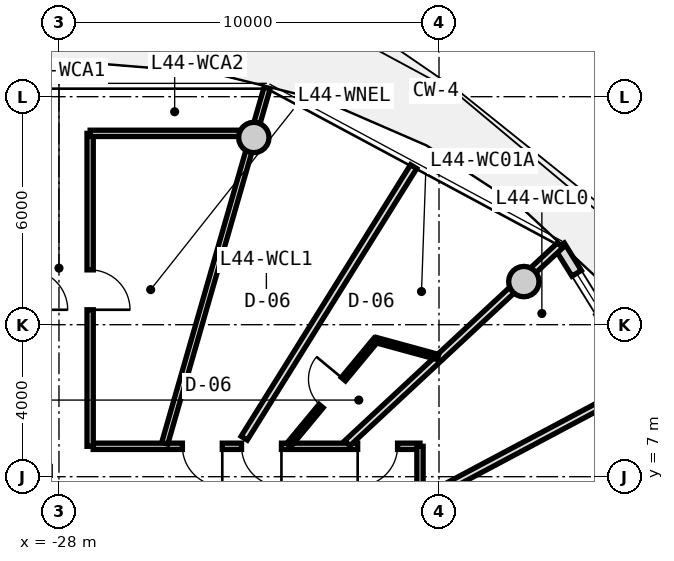
"""IFC4 building model, lengths in metres.
Left out: names, types, materials, properties, quantities, classifications, styles, units other than length and angle.
Written with IfcOpenShell. Run it as: python <this file> out.ifc"""

import sys

from ifc_helpers import new_model, si_unit, direction, frame, frame_2d, origin, origin_2d, place, context, subcontext, project, spatial, rectangle, circle, extrude, source, transform, mapped, element, fill, save


model = new_model("IFC4")
c1 = context("Model", 3, precision=1e-05, world=origin(), true_north=direction((0.0, 1.0)))
c2 = subcontext(c1, "Body", "Model", "MODEL_VIEW")
j1 = project(units=[si_unit("LENGTHUNIT", "METRE"), si_unit("PLANEANGLEUNIT", "RADIAN")], contexts=[c1])
p1 = place(None, origin())
s1 = spatial("IfcSite", under=j1, at=p1, CompositionType="ELEMENT")
p2 = place(p1, origin())
s2 = spatial("IfcBuilding", under=s1, at=p2, CompositionType="ELEMENT")
p3 = place(p2, frame((0.0, 0.0, 143.45)))
s3 = spatial("IfcBuildingStorey", under=s2, at=p3, CompositionType="ELEMENT", Elevation=143.45)
m1 = source(origin(), c2, "Body", "SweptSolid", [
    extrude(circle(Radius=0.4, at=origin_2d()), origin(), (0.0, 0.0, 1.0), 3.05),
])
for number, where, z_axis, x_axis in (
    (1, (-15.767, 12.135, 0.0), (0.0, 0.0, 1.0), (1.0, 0.0, 0.0)),
    (2, (-22.873, 15.926, 0.0), (0.0, 0.0, 1.0), (1.0, 0.0, 0.0)),
):
    element("IfcColumn", number, at=place(p3, frame(where, z_axis=z_axis, x_axis=x_axis)), inside=s3, PredefinedType="COLUMN", context=c2, shape_type="MappedRepresentation", body=[
        mapped(m1, transform((0.0, 0.0, 0.0), x_axis=(1.0, 0.0, 0.0), y_axis=(0.0, 1.0, 0.0), z_axis=(0.0, 0.0, 1.0), scale=1.0)),
    ])
m2 = source(origin(), c2, "Body", "SweptSolid", [
    extrude(rectangle(XDim=8.431, YDim=0.29, at=frame_2d((4.216, 0.0))), origin(), (0.0, 0.0, 1.0), 2.81),
])
p4 = place(p3, frame((-14.827, 13.075, 0.0), z_axis=(0.0, 0.0, 1.0), x_axis=(0.527377998418, -0.849630770855, 0.0)))
e3 = element("IfcWall", 3, at=p4, inside=s3, PredefinedType="SOLIDWALL", context=c2, shape_type="MappedRepresentation", body=[
    mapped(m2, transform((0.0, 0.0, 0.0), x_axis=(1.0, 0.0, 0.0), y_axis=(0.0, 1.0, 0.0), z_axis=(0.0, 0.0, 1.0), scale=1.0)),
])
p5 = place(p4, frame((5.78, 0.0, 0.0)))
e4 = element("IfcOpeningElement", 4, at=p5, cuts=e3, PredefinedType="OPENING", context=c2, shape_type="SweptSolid", body=[
    extrude(rectangle(XDim=1.15, YDim=2.25, at=frame_2d((0.575, 1.125))), frame((0.0, 0.155, 0.0), z_axis=(0.0, -1.0, 0.0), x_axis=(1.0, 0.0, 0.0)), (0.0, 0.0, 1.0), 0.31),
])
p6 = place(p4, frame((0.85, 0.0, 0.85)))
e5 = element("IfcOpeningElement", 5, at=p6, cuts=e3, PredefinedType="OPENING", context=c2, shape_type="SweptSolid", body=[
    extrude(rectangle(XDim=1.2, YDim=1.5, at=frame_2d((0.6, 0.75))), frame((0.0, 0.155, 0.0), z_axis=(0.0, -1.0, 0.0), x_axis=(1.0, 0.0, 0.0)), (0.0, 0.0, 1.0), 0.31),
])
m3 = source(origin(), c2, "Body", "SweptSolid", [
    extrude(rectangle(XDim=8.6, YDim=0.165, at=frame_2d((4.3, 0.0))), origin(), (0.0, 0.0, 1.0), 2.795),
])
p7 = place(p3, frame((-27.1, 7.8, 0.0), z_axis=(0.0, 0.0, 1.0), x_axis=(1.0, 0.0, 0.0)))
e6 = element("IfcWall", 6, at=p7, inside=s3, PredefinedType="PARTITIONING", context=c2, shape_type="MappedRepresentation", body=[
    mapped(m3, transform((0.0, 0.0, 0.0), x_axis=(1.0, 0.0, 0.0), y_axis=(0.0, 1.0, 0.0), z_axis=(0.0, 0.0, 1.0), scale=1.0)),
])
p8 = place(p7, frame((6.96, 0.0, 0.0)))
e7 = element("IfcOpeningElement", 7, at=p8, cuts=e6, PredefinedType="OPENING", context=c2, shape_type="SweptSolid", body=[
    extrude(rectangle(XDim=1.05, YDim=2.15, at=frame_2d((0.525, 1.075))), frame((0.0, 0.093, 0.0), z_axis=(0.0, -1.0, 0.0), x_axis=(1.0, 0.0, 0.0)), (0.0, 0.0, 1.0), 0.185),
])
p9 = place(p7, frame((3.904, 0.0, 0.0)))
e8 = element("IfcOpeningElement", 8, at=p9, cuts=e6, PredefinedType="OPENING", context=c2, shape_type="SweptSolid", body=[
    extrude(rectangle(XDim=1.05, YDim=2.15, at=frame_2d((0.525, 1.075))), frame((0.0, 0.093, 0.0), z_axis=(0.0, -1.0, 0.0), x_axis=(1.0, 0.0, 0.0)), (0.0, 0.0, 1.0), 0.185),
])
p10 = place(p7, frame((2.347, 0.0, 0.0)))
e9 = element("IfcOpeningElement", 9, at=p10, cuts=e6, PredefinedType="OPENING", context=c2, shape_type="SweptSolid", body=[
    extrude(rectangle(XDim=1.05, YDim=2.15, at=frame_2d((0.525, 1.075))), frame((0.0, 0.093, 0.0), z_axis=(0.0, -1.0, 0.0), x_axis=(1.0, 0.0, 0.0)), (0.0, 0.0, 1.0), 0.185),
])
m4 = source(origin(), c2, "Body", "SweptSolid", [
    extrude(rectangle(XDim=15.6, YDim=0.165, at=frame_2d((7.8, 0.0))), origin(), (0.0, 0.0, 1.0), 2.795),
])
p11 = place(p3, frame((-18.5, 7.8, 0.0), z_axis=(0.0, 0.0, 1.0), x_axis=(0.0, -1.0, 0.0)))
e10 = element("IfcWall", 10, at=p11, inside=s3, PredefinedType="PARTITIONING", context=c2, shape_type="MappedRepresentation", body=[
    mapped(m4, transform((0.0, 0.0, 0.0), x_axis=(1.0, 0.0, 0.0), y_axis=(0.0, 1.0, 0.0), z_axis=(0.0, 0.0, 1.0), scale=1.0)),
])
p12 = place(p11, frame((8.314, 0.0, 0.0)))
e11 = element("IfcOpeningElement", 11, at=p12, cuts=e10, PredefinedType="OPENING", context=c2, shape_type="SweptSolid", body=[
    extrude(rectangle(XDim=1.25, YDim=2.2, at=frame_2d((0.625, 1.1))), frame((0.0, 0.093, 0.0), z_axis=(0.0, -1.0, 0.0), x_axis=(1.0, 0.0, 0.0)), (0.0, 0.0, 1.0), 0.185),
])
p13 = place(p11, frame((1.515, 0.0, 0.0)))
e12 = element("IfcOpeningElement", 12, at=p13, cuts=e10, PredefinedType="OPENING", context=c2, shape_type="SweptSolid", body=[
    extrude(rectangle(XDim=1.05, YDim=2.15, at=frame_2d((0.525, 1.075))), frame((0.0, 0.093, 0.0), z_axis=(0.0, -1.0, 0.0), x_axis=(1.0, 0.0, 0.0)), (0.0, 0.0, 1.0), 0.185),
])
m5 = source(origin(), c2, "Body", "SweptSolid", [
    extrude(rectangle(XDim=9.73, YDim=0.165, at=frame_2d((4.865, 0.0))), origin(), (0.0, 0.0, 1.0), 2.435),
])
p14 = place(p3, frame((-25.217, 7.88, 0.0), z_axis=(0.0, 0.0, 1.0), x_axis=(0.27679492614, 0.960929013436, 0.0)))
e13 = element("IfcWall", 13, at=p14, inside=s3, PredefinedType="PARTITIONING", context=c2, shape_type="MappedRepresentation", body=[
    mapped(m5, transform((0.0, 0.0, 0.0), x_axis=(1.0, 0.0, 0.0), y_axis=(0.0, 1.0, 0.0), z_axis=(0.0, 0.0, 1.0), scale=1.0)),
])
m6 = source(origin(), c2, "Body", "SweptSolid", [
    extrude(rectangle(XDim=8.235, YDim=0.165, at=frame_2d((4.118, 0.0))), origin(), (0.0, 0.0, 1.0), 2.795),
])
p15 = place(p3, frame((-27.18, 7.8, 0.0), z_axis=(0.0, 0.0, 1.0), x_axis=(0.0, 1.0, 0.0)))
e14 = element("IfcWall", 14, at=p15, inside=s3, PredefinedType="PARTITIONING", context=c2, shape_type="MappedRepresentation", body=[
    mapped(m6, transform((0.0, 0.0, 0.0), x_axis=(1.0, 0.0, 0.0), y_axis=(0.0, 1.0, 0.0), z_axis=(0.0, 0.0, 1.0), scale=1.0)),
])
p16 = place(p15, frame((3.593, 0.0, 0.0)))
e15 = element("IfcOpeningElement", 15, at=p16, cuts=e14, PredefinedType="OPENING", context=c2, shape_type="SweptSolid", body=[
    extrude(rectangle(XDim=1.05, YDim=2.15, at=frame_2d((0.525, 1.075))), frame((0.0, 0.093, 0.0), z_axis=(0.0, -1.0, 0.0), x_axis=(1.0, 0.0, 0.0)), (0.0, 0.0, 1.0), 0.185),
])
m7 = source(origin(), c2, "Body", "SweptSolid", [
    extrude(rectangle(XDim=4.469, YDim=0.165, at=frame_2d((2.234, 0.0))), origin(), (0.0, 0.0, 1.0), 2.345),
])
p17 = place(p3, frame((-27.18, 16.035, 0.0), z_axis=(0.0, 0.0, 1.0), x_axis=(1.0, 0.0, 0.0)))
e16 = element("IfcWall", 16, at=p17, inside=s3, PredefinedType="PARTITIONING", context=c2, shape_type="MappedRepresentation", body=[
    mapped(m7, transform((0.0, 0.0, 0.0), x_axis=(1.0, 0.0, 0.0), y_axis=(0.0, 1.0, 0.0), z_axis=(0.0, 0.0, 1.0), scale=1.0)),
])
m8 = source(origin(), c2, "Body", "SweptSolid", [
    extrude(rectangle(XDim=7.648, YDim=0.19, at=frame_2d((3.824, 0.0))), origin(), (0.0, 0.0, 1.0), 2.345),
])
p18 = place(p3, frame((-20.413, 7.88, 0.0), z_axis=(0.0, 0.0, 1.0), x_axis=(0.732182665826, 0.681108320213, 0.0)))
e17 = element("IfcWall", 17, at=p18, inside=s3, PredefinedType="PARTITIONING", context=c2, shape_type="MappedRepresentation", body=[
    mapped(m8, transform((0.0, 0.0, 0.0), x_axis=(1.0, 0.0, 0.0), y_axis=(0.0, 1.0, 0.0), z_axis=(0.0, 0.0, 1.0), scale=1.0)),
])
m9 = source(origin(), c2, "Body", "SweptSolid", [
    extrude(rectangle(XDim=6.499, YDim=0.19, at=frame_2d((3.25, 0.0))), origin(), (0.0, 0.0, 1.0), 2.795),
])
p19 = place(p3, frame((-18.324, 6.449, 0.0), z_axis=(0.0, 0.0, 1.0), x_axis=(0.882715595921, 0.469907625729, 0.0)))
e18 = element("IfcWall", 18, at=p19, inside=s3, PredefinedType="PARTITIONING", context=c2, shape_type="MappedRepresentation", body=[
    mapped(m9, transform((0.0, 0.0, 0.0), x_axis=(1.0, 0.0, 0.0), y_axis=(0.0, 1.0, 0.0), z_axis=(0.0, 0.0, 1.0), scale=1.0)),
])
m10 = source(origin(), c2, "Body", "SweptSolid", [
    extrude(rectangle(XDim=8.422, YDim=0.19, at=frame_2d((4.211, 0.0))), origin(), (0.0, 0.0, 1.0), 2.795),
])
p20 = place(p3, frame((-23.125, 8.014, 0.0), z_axis=(0.0, 0.0, 1.0), x_axis=(0.52925352896, 0.848463730565, 0.0)))
e19 = element("IfcWall", 19, at=p20, inside=s3, PredefinedType="PARTITIONING", context=c2, shape_type="MappedRepresentation", body=[
    mapped(m10, transform((0.0, 0.0, 0.0), x_axis=(1.0, 0.0, 0.0), y_axis=(0.0, 1.0, 0.0), z_axis=(0.0, 0.0, 1.0), scale=1.0)),
])
m11 = source(origin(), c2, "Body", "SweptSolid", [
    extrude(rectangle(XDim=3.593, YDim=0.14, at=frame_2d((1.797, 0.0))), origin(), (0.0, 0.0, 1.0), 2.795),
])
p21 = place(p3, frame((-21.955, 7.83, 0.0), z_axis=(0.0, 0.0, 1.0), x_axis=(0.638271060163, 0.769811700196, 0.0)))
e20 = element("IfcWall", 20, at=p21, inside=s3, PredefinedType="PARTITIONING", context=c2, shape_type="MappedRepresentation", body=[
    mapped(m11, transform((0.0, 0.0, 0.0), x_axis=(1.0, 0.0, 0.0), y_axis=(0.0, 1.0, 0.0), z_axis=(0.0, 0.0, 1.0), scale=1.0)),
])
p22 = place(p21, frame((1.337, 0.0, 0.0)))
e21 = element("IfcOpeningElement", 21, at=p22, cuts=e20, PredefinedType="OPENING", context=c2, shape_type="SweptSolid", body=[
    extrude(rectangle(XDim=0.92, YDim=2.1, at=frame_2d((0.46, 1.05))), frame((0.0, 0.08, 0.0), z_axis=(0.0, -1.0, 0.0), x_axis=(1.0, 0.0, 0.0)), (0.0, 0.0, 1.0), 0.16),
])
m12 = source(origin(), c2, "Body", "SweptSolid", [
    extrude(rectangle(XDim=1.697, YDim=0.14, at=frame_2d((0.848, 0.0))), origin(), (0.0, 0.0, 1.0), 2.795),
])
p23 = place(p3, frame((-19.662, 10.596, 0.0), z_axis=(0.0, 0.0, 1.0), x_axis=(0.964667458123, -0.263470482671, 0.0)))
e22 = element("IfcWall", 22, at=p23, inside=s3, PredefinedType="PARTITIONING", context=c2, shape_type="MappedRepresentation", body=[
    mapped(m12, transform((0.0, 0.0, 0.0), x_axis=(1.0, 0.0, 0.0), y_axis=(0.0, 1.0, 0.0), z_axis=(0.0, 0.0, 1.0), scale=1.0)),
])
m13 = source(origin(), c2, "Body", "SweptSolid", [
    extrude(rectangle(XDim=1.2, YDim=1.5, at=frame_2d((0.6, 0.75))), frame((0.0, 0.03, 0.0), z_axis=(0.0, -1.0, 0.0), x_axis=(1.0, 0.0, 0.0)), (0.0, 0.0, 1.0), 0.06),
])
p24 = place(p6, origin())
e23 = element("IfcWindow", 23, at=p24, inside=s3, PartitioningType="SINGLE_PANEL", PredefinedType="WINDOW", context=c2, shape_type="MappedRepresentation", body=[
    mapped(m13, transform((0.0, 0.0, 0.0), x_axis=(1.0, 0.0, 0.0), y_axis=(0.0, 1.0, 0.0), z_axis=(0.0, 0.0, 1.0), scale=1.0)),
])
fill(e5, e23)
m14 = source(origin(), c2, "Body", "SweptSolid", [
    extrude(rectangle(XDim=1.05, YDim=2.15, at=frame_2d((0.525, 1.075))), frame((0.0, 0.025, 0.0), z_axis=(0.0, -1.0, 0.0), x_axis=(1.0, 0.0, 0.0)), (0.0, 0.0, 1.0), 0.05),
])
p25 = place(p16, frame((1.05, 0.0, 0.0), z_axis=(0.0, 0.0, 1.0), x_axis=(-1.0, 0.0, 0.0)))
e24 = element("IfcDoor", 24, at=p25, inside=s3, OperationType="SINGLE_SWING_RIGHT", PredefinedType="DOOR", context=c2, shape_type="MappedRepresentation", body=[
    mapped(m14, transform((0.0, 0.0, 0.0), x_axis=(1.0, 0.0, 0.0), y_axis=(0.0, 1.0, 0.0), z_axis=(0.0, 0.0, 1.0), scale=1.0)),
])
fill(e15, e24)
p26 = place(p8, frame((1.05, 0.0, 0.0), z_axis=(0.0, 0.0, 1.0), x_axis=(-1.0, 0.0, 0.0)))
e25 = element("IfcDoor", 25, at=p26, inside=s3, OperationType="SINGLE_SWING_RIGHT", PredefinedType="DOOR", context=c2, shape_type="MappedRepresentation", body=[
    mapped(m14, transform((0.0, 0.0, 0.0), x_axis=(1.0, 0.0, 0.0), y_axis=(0.0, 1.0, 0.0), z_axis=(0.0, 0.0, 1.0), scale=1.0)),
])
fill(e7, e25)
p27 = place(p9, frame((1.05, 0.0, 0.0), z_axis=(0.0, 0.0, 1.0), x_axis=(-1.0, 0.0, 0.0)))
e26 = element("IfcDoor", 26, at=p27, inside=s3, OperationType="SINGLE_SWING_LEFT", PredefinedType="DOOR", context=c2, shape_type="MappedRepresentation", body=[
    mapped(m14, transform((0.0, 0.0, 0.0), x_axis=(1.0, 0.0, 0.0), y_axis=(0.0, 1.0, 0.0), z_axis=(0.0, 0.0, 1.0), scale=1.0)),
])
fill(e8, e26)
m15 = source(origin(), c2, "Body", "SweptSolid", [
    extrude(rectangle(XDim=0.92, YDim=2.1, at=frame_2d((0.46, 1.05))), frame((0.0, 0.025, 0.0), z_axis=(0.0, -1.0, 0.0), x_axis=(1.0, 0.0, 0.0)), (0.0, 0.0, 1.0), 0.05),
])
p28 = place(p22, origin())
e27 = element("IfcDoor", 27, at=p28, inside=s3, OperationType="SINGLE_SWING_RIGHT", PredefinedType="DOOR", context=c2, shape_type="MappedRepresentation", body=[
    mapped(m15, transform((0.0, 0.0, 0.0), x_axis=(1.0, 0.0, 0.0), y_axis=(0.0, 1.0, 0.0), z_axis=(0.0, 0.0, 1.0), scale=1.0)),
])
fill(e21, e27)
p29 = place(p10, frame((1.05, 0.0, 0.0), z_axis=(0.0, 0.0, 1.0), x_axis=(-1.0, 0.0, 0.0)))
e28 = element("IfcDoor", 28, at=p29, inside=s3, OperationType="SINGLE_SWING_LEFT", PredefinedType="DOOR", context=c2, shape_type="MappedRepresentation", body=[
    mapped(m14, transform((0.0, 0.0, 0.0), x_axis=(1.0, 0.0, 0.0), y_axis=(0.0, 1.0, 0.0), z_axis=(0.0, 0.0, 1.0), scale=1.0)),
])
fill(e9, e28)
save(model, sys.argv[1])
